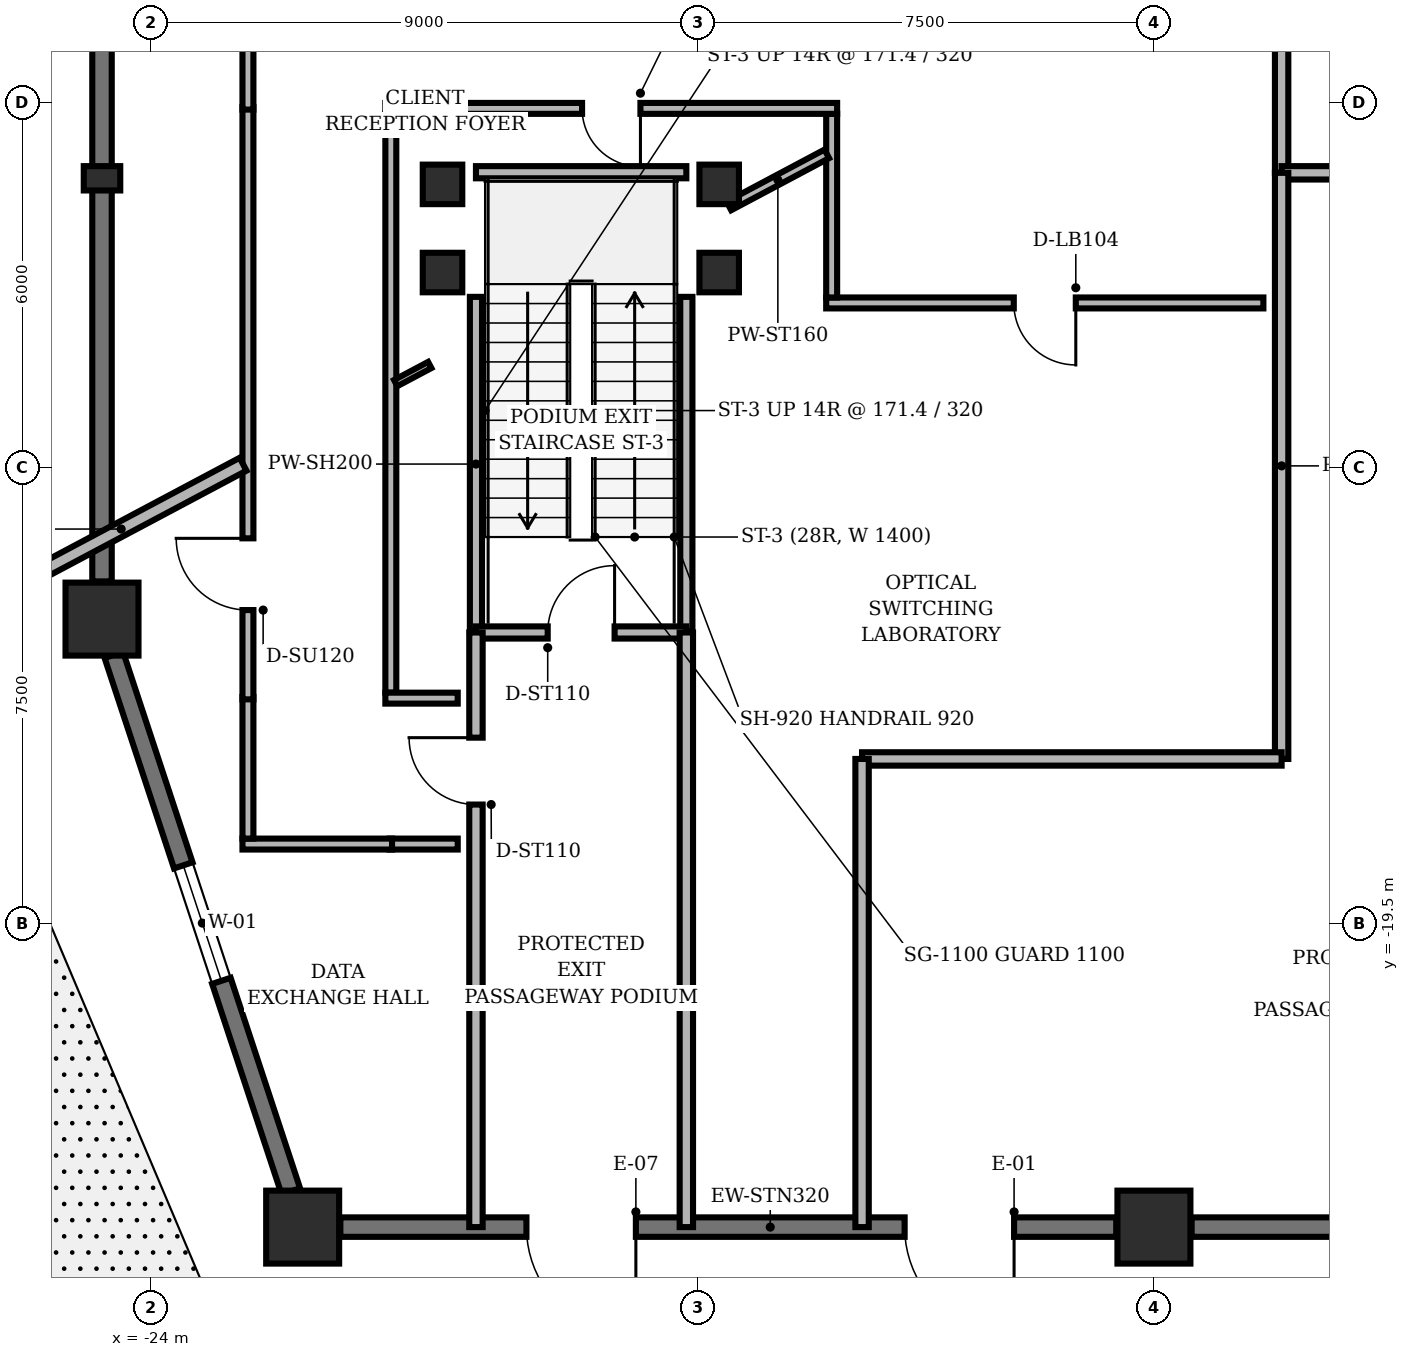
"""IFC4 building model, lengths in metres.
Left out: names, types, materials, properties, quantities, classifications, styles, units other than length and angle.
Written with IfcOpenShell. Run it as: python <this file> out.ifc"""

import sys

from ifc_helpers import new_model, si_unit, direction, frame, frame_2d, origin, origin_2d, place, context, subcontext, project, spatial, rectangle, extrude, element, fill, save


model = new_model("IFC4")
c1 = context("Model", 3, precision=1e-05, world=origin(), true_north=direction((0.0, 1.0)))
c2 = subcontext(c1, "Body", "Model", "MODEL_VIEW")
j1 = project(units=[si_unit("LENGTHUNIT", "METRE"), si_unit("PLANEANGLEUNIT", "RADIAN")], contexts=[c1])
p1 = place(None, origin())
s1 = spatial("IfcSite", under=j1, at=p1, CompositionType="ELEMENT")
p2 = place(p1, origin())
s2 = spatial("IfcBuilding", under=s1, at=p2, CompositionType="ELEMENT")
p3 = place(p2, origin())
s3 = spatial("IfcBuildingStorey", under=s2, at=p3, CompositionType="ELEMENT", Elevation=0.0)
for number, where, z_axis, x_axis in (
    (1, (-21.5, -24.5, 0.0), (0.0, 0.0, 1.0), (1.0, 0.0, 0.0)),
    (2, (-7.5, -24.5, 0.0), (0.0, 0.0, 1.0), (1.0, 0.0, 0.0)),
    (3, (-24.8, -14.5, 0.0), (0.0, 0.0, 1.0), (1.0, 0.0, 0.0)),
):
    element("IfcColumn", number, at=place(p3, frame(where, z_axis=z_axis, x_axis=x_axis)), inside=s3, PredefinedType="COLUMN", context=c2, shape_type="SweptSolid", body=[
        extrude(rectangle(XDim=1.2, YDim=1.2, at=origin_2d()), origin(), (0.0, 0.0, 1.0), 4.8),
    ])
for number, where, z_axis, x_axis in (
    (4, (-19.2, -8.8, 0.0), (0.0, 0.0, 1.0), (1.0, 0.0, 0.0)),
    (5, (-14.65, -8.8, 0.0), (0.0, 0.0, 1.0), (1.0, 0.0, 0.0)),
    (6, (-19.2, -7.35, 0.0), (0.0, 0.0, 1.0), (1.0, 0.0, 0.0)),
    (7, (-14.65, -7.35, 0.0), (0.0, 0.0, 1.0), (1.0, 0.0, 0.0)),
):
    element("IfcColumn", number, at=place(p3, frame(where, z_axis=z_axis, x_axis=x_axis)), inside=s3, PredefinedType="COLUMN", context=c2, shape_type="SweptSolid", body=[
        extrude(rectangle(XDim=0.65, YDim=0.65, at=origin_2d()), origin(), (0.0, 0.0, 1.0), 4.8),
    ])
p4 = place(p3, frame((-24.8, -7.25, 0.0), z_axis=(0.0, 0.0, 1.0), x_axis=(1.0, 0.0, 0.0)))
e8 = element("IfcColumn", 8, at=p4, inside=s3, PredefinedType="PILASTER", context=c2, shape_type="SweptSolid", body=[
    extrude(rectangle(XDim=0.6, YDim=0.4, at=origin_2d()), origin(), (0.0, 0.0, 1.0), 4.8),
])
p5 = place(p3, frame((-8.12, -24.5, 0.0), z_axis=(0.0, 0.0, 1.0), x_axis=(-1.0, 0.0, 0.0)))
e9 = element("IfcWall", 9, at=p5, inside=s3, PredefinedType="SOLIDWALL", context=c2, shape_type="SweptSolid", body=[
    extrude(rectangle(XDim=12.76, YDim=0.32, at=frame_2d((6.38, 0.0))), origin(), (0.0, 0.0, 1.0), 3.868),
])
p6 = place(p5, frame((1.68, 0.0, 0.0)))
e10 = element("IfcOpeningElement", 10, at=p6, cuts=e9, PredefinedType="OPENING", context=c2, shape_type="SweptSolid", body=[
    extrude(rectangle(XDim=1.8, YDim=2.3, at=frame_2d((0.9, 1.15))), frame((0.0, 0.17, 0.0), z_axis=(0.0, -1.0, 0.0), x_axis=(1.0, 0.0, 0.0)), (0.0, 0.0, 1.0), 0.34),
])
p7 = place(p5, frame((7.9, 0.0, 0.0)))
e11 = element("IfcOpeningElement", 11, at=p7, cuts=e9, PredefinedType="OPENING", context=c2, shape_type="SweptSolid", body=[
    extrude(rectangle(XDim=1.8, YDim=2.3, at=frame_2d((0.9, 1.15))), frame((0.0, 0.17, 0.0), z_axis=(0.0, -1.0, 0.0), x_axis=(1.0, 0.0, 0.0)), (0.0, 0.0, 1.0), 0.34),
])
p8 = place(p3, frame((4.88, -24.5, 0.0), z_axis=(0.0, 0.0, 1.0), x_axis=(-1.0, 0.0, 0.0)))
e12 = element("IfcWall", 12, at=p8, inside=s3, PredefinedType="SOLIDWALL", context=c2, shape_type="SweptSolid", body=[
    extrude(rectangle(XDim=11.76, YDim=0.32, at=frame_2d((5.88, 0.0))), origin(), (0.0, 0.0, 1.0), 3.868),
])
p9 = place(p8, frame((1.18, 0.0, 0.0)))
e13 = element("IfcOpeningElement", 13, at=p9, cuts=e12, PredefinedType="OPENING", context=c2, shape_type="SweptSolid", body=[
    extrude(rectangle(XDim=1.8, YDim=2.3, at=frame_2d((0.9, 1.15))), frame((0.0, 0.17, 0.0), z_axis=(0.0, -1.0, 0.0), x_axis=(1.0, 0.0, 0.0)), (0.0, 0.0, 1.0), 0.34),
])
p10 = place(p3, frame((-24.8, -13.88, 0.0), z_axis=(0.0, 0.0, 1.0), x_axis=(0.0, 1.0, 0.0)))
e14 = element("IfcWall", 14, at=p10, inside=s3, PredefinedType="SOLIDWALL", context=c2, shape_type="SweptSolid", body=[
    extrude(rectangle(XDim=13.26, YDim=0.32, at=frame_2d((6.63, 0.0))), origin(), (0.0, 0.0, 1.0), 3.868),
])
p11 = place(p3, frame((-21.694, -23.911, 0.0), z_axis=(0.0, 0.0, 1.0), x_axis=(-0.313380298023, 0.949627710638, 0.0)))
e15 = element("IfcWall", 15, at=p11, inside=s3, PredefinedType="SOLIDWALL", context=c2, shape_type="SweptSolid", body=[
    extrude(rectangle(XDim=9.29, YDim=0.32, at=frame_2d((4.645, 0.0))), origin(), (0.0, 0.0, 1.0), 3.868),
])
p12 = place(p11, frame((3.645, 0.0, 0.65)))
e16 = element("IfcOpeningElement", 16, at=p12, cuts=e15, PredefinedType="OPENING", context=c2, shape_type="SweptSolid", body=[
    extrude(rectangle(XDim=2.0, YDim=1.6, at=frame_2d((1.0, 0.8))), frame((0.0, 0.17, 0.0), z_axis=(0.0, -1.0, 0.0), x_axis=(1.0, 0.0, 0.0)), (0.0, 0.0, 1.0), 0.34),
])
p13 = place(p3, frame((-5.4, -7.16, 0.0), z_axis=(0.0, 0.0, 1.0), x_axis=(0.0, 1.0, 0.0)))
e17 = element("IfcWall", 17, at=p13, inside=s3, PredefinedType="PARTITIONING", context=c2, shape_type="SweptSolid", body=[
    extrude(rectangle(XDim=2.71, YDim=0.22, at=frame_2d((1.355, 0.0))), origin(), (0.0, 0.0, 1.0), 4.473),
])
p14 = place(p3, frame((0.0, -7.16, 0.0), z_axis=(0.0, 0.0, 1.0), x_axis=(-1.0, 0.0, 0.0)))
e18 = element("IfcWall", 18, at=p14, inside=s3, PredefinedType="PARTITIONING", context=c2, shape_type="SweptSolid", body=[
    extrude(rectangle(XDim=5.4, YDim=0.22, at=frame_2d((2.7, 0.0))), origin(), (0.0, 0.0, 1.0), 4.473),
])
p15 = place(p14, frame((2.85, 0.0, 0.0)))
e19 = element("IfcOpeningElement", 19, at=p15, cuts=e18, PredefinedType="OPENING", context=c2, shape_type="SweptSolid", body=[
    extrude(rectangle(XDim=1.12, YDim=2.02, at=frame_2d((0.56, 1.01))), frame((0.0, 0.12, 0.0), z_axis=(0.0, -1.0, 0.0), x_axis=(1.0, 0.0, 0.0)), (0.0, 0.0, 1.0), 0.24),
])
for number, where, z_axis, x_axis in (
    (20, (-18.65, -14.7, 0.0), (0.0, 0.0, 1.0), (0.0, 1.0, 0.0)),
    (21, (-15.19, -14.7, 0.0), (0.0, 0.0, 1.0), (0.0, 1.0, 0.0)),
):
    element("IfcWall", number, at=place(p3, frame(where, z_axis=z_axis, x_axis=x_axis)), inside=s3, PredefinedType="PARTITIONING", context=c2, shape_type="SweptSolid", body=[
        extrude(rectangle(XDim=5.5, YDim=0.2, at=frame_2d((2.75, 0.0))), origin(), (0.0, 0.0, 1.0), 4.473),
    ])
p16 = place(p3, frame((-18.65, -7.15, 0.0), z_axis=(0.0, 0.0, 1.0), x_axis=(1.0, 0.0, 0.0)))
e22 = element("IfcWall", 22, at=p16, inside=s3, PredefinedType="PARTITIONING", context=c2, shape_type="SweptSolid", body=[
    extrude(rectangle(XDim=3.46, YDim=0.2, at=frame_2d((1.73, 0.0))), origin(), (0.0, 0.0, 1.0), 1.797),
])
p17 = place(p3, frame((-18.65, -14.72, 0.0), z_axis=(0.0, 0.0, 1.0), x_axis=(1.0, 0.0, 0.0)))
e23 = element("IfcWall", 23, at=p17, inside=s3, PredefinedType="PARTITIONING", context=c2, shape_type="SweptSolid", body=[
    extrude(rectangle(XDim=3.46, YDim=0.2, at=frame_2d((1.73, 0.0))), origin(), (0.0, 0.0, 1.0), 4.473),
])
p18 = place(p17, frame((1.18, 0.0, 0.0)))
e24 = element("IfcOpeningElement", 24, at=p18, cuts=e23, PredefinedType="OPENING", context=c2, shape_type="SweptSolid", body=[
    extrude(rectangle(XDim=1.1, YDim=2.04, at=frame_2d((0.55, 1.02))), frame((0.0, 0.11, 0.0), z_axis=(0.0, -1.0, 0.0), x_axis=(1.0, 0.0, 0.0)), (0.0, 0.0, 1.0), 0.22),
])
p19 = place(p3, frame((-5.4, -16.8, 0.0), z_axis=(0.0, 0.0, 1.0), x_axis=(0.0, 1.0, 0.0)))
e25 = element("IfcWall", 25, at=p19, inside=s3, PredefinedType="PARTITIONING", context=c2, shape_type="SweptSolid", body=[
    extrude(rectangle(XDim=9.64, YDim=0.22, at=frame_2d((4.82, 0.0))), origin(), (0.0, 0.0, 1.0), 4.473),
])
p20 = place(p3, frame((-12.3, -16.8, 0.0), z_axis=(0.0, 0.0, 1.0), x_axis=(1.0, 0.0, 0.0)))
e26 = element("IfcWall", 26, at=p20, inside=s3, PredefinedType="PARTITIONING", context=c2, shape_type="SweptSolid", body=[
    extrude(rectangle(XDim=6.9, YDim=0.22, at=frame_2d((3.45, 0.0))), origin(), (0.0, 0.0, 1.0), 4.473),
])
p21 = place(p3, frame((-12.3, -24.5, 0.0), z_axis=(0.0, 0.0, 1.0), x_axis=(0.0, 1.0, 0.0)))
e27 = element("IfcWall", 27, at=p21, inside=s3, PredefinedType="PARTITIONING", context=c2, shape_type="SweptSolid", body=[
    extrude(rectangle(XDim=7.7, YDim=0.22, at=frame_2d((3.85, 0.0))), origin(), (0.0, 0.0, 1.0), 4.473),
])
p22 = place(p3, frame((-18.65, -24.5, 0.0), z_axis=(0.0, 0.0, 1.0), x_axis=(0.0, 1.0, 0.0)))
e28 = element("IfcWall", 28, at=p22, inside=s3, PredefinedType="PARTITIONING", context=c2, shape_type="SweptSolid", body=[
    extrude(rectangle(XDim=9.78, YDim=0.22, at=frame_2d((4.89, 0.0))), origin(), (0.0, 0.0, 1.0), 4.473),
])
p23 = place(p22, frame((6.95, 0.0, 0.0)))
e29 = element("IfcOpeningElement", 29, at=p23, cuts=e28, PredefinedType="OPENING", context=c2, shape_type="SweptSolid", body=[
    extrude(rectangle(XDim=1.1, YDim=2.04, at=frame_2d((0.55, 1.02))), frame((0.0, 0.12, 0.0), z_axis=(0.0, -1.0, 0.0), x_axis=(1.0, 0.0, 0.0)), (0.0, 0.0, 1.0), 0.24),
])
p24 = place(p3, frame((-15.19, -24.5, 0.0), z_axis=(0.0, 0.0, 1.0), x_axis=(0.0, 1.0, 0.0)))
e30 = element("IfcWall", 30, at=p24, inside=s3, PredefinedType="PARTITIONING", context=c2, shape_type="SweptSolid", body=[
    extrude(rectangle(XDim=9.78, YDim=0.22, at=frame_2d((4.89, 0.0))), origin(), (0.0, 0.0, 1.0), 4.473),
])
p25 = place(p3, frame((-5.7, -9.3, 0.0), z_axis=(0.0, 0.0, 1.0), x_axis=(-1.0, 0.0, 0.0)))
e31 = element("IfcWall", 31, at=p25, inside=s3, PredefinedType="PARTITIONING", context=c2, shape_type="SweptSolid", body=[
    extrude(rectangle(XDim=7.19, YDim=0.18, at=frame_2d((3.595, 0.0))), origin(), (0.0, 0.0, 1.0), 3.987),
])
p26 = place(p25, frame((3.085, 0.0, 0.0)))
e32 = element("IfcOpeningElement", 32, at=p26, cuts=e31, PredefinedType="OPENING", context=c2, shape_type="SweptSolid", body=[
    extrude(rectangle(XDim=1.02, YDim=2.02, at=frame_2d((0.51, 1.01))), frame((0.0, 0.1, 0.0), z_axis=(0.0, -1.0, 0.0), x_axis=(1.0, 0.0, 0.0)), (0.0, 0.0, 1.0), 0.2),
])
p27 = place(p3, frame((-12.8, -9.21, 0.0), z_axis=(0.0, 0.0, 1.0), x_axis=(0.0, 1.0, 0.0)))
e33 = element("IfcWall", 33, at=p27, inside=s3, PredefinedType="PARTITIONING", context=c2, shape_type="SweptSolid", body=[
    extrude(rectangle(XDim=3.02, YDim=0.18, at=frame_2d((1.51, 0.0))), origin(), (0.0, 0.0, 1.0), 4.473),
])
p28 = place(p3, frame((-12.71, -6.1, 0.0), z_axis=(0.0, 0.0, 1.0), x_axis=(-1.0, 0.0, 0.0)))
e34 = element("IfcWall", 34, at=p28, inside=s3, PredefinedType="PARTITIONING", context=c2, shape_type="SweptSolid", body=[
    extrude(rectangle(XDim=7.43, YDim=0.18, at=frame_2d((3.715, 0.0))), origin(), (0.0, 0.0, 1.0), 4.473),
])
p29 = place(p28, frame((3.235, 0.0, 0.0)))
e35 = element("IfcOpeningElement", 35, at=p29, cuts=e34, PredefinedType="OPENING", context=c2, shape_type="SweptSolid", body=[
    extrude(rectangle(XDim=0.96, YDim=2.02, at=frame_2d((0.48, 1.01))), frame((0.0, 0.1, 0.0), z_axis=(0.0, -1.0, 0.0), x_axis=(1.0, 0.0, 0.0)), (0.0, 0.0, 1.0), 0.2),
])
p30 = place(p3, frame((-20.05, -6.19, 0.0), z_axis=(0.0, 0.0, 1.0), x_axis=(0.0, -1.0, 0.0)))
e36 = element("IfcWall", 36, at=p30, inside=s3, PredefinedType="PARTITIONING", context=c2, shape_type="SweptSolid", body=[
    extrude(rectangle(XDim=9.52, YDim=0.18, at=frame_2d((4.76, 0.0))), origin(), (0.0, 0.0, 1.0), 3.526),
])
p31 = place(p3, frame((-20.14, -15.8, 0.0), z_axis=(0.0, 0.0, 1.0), x_axis=(1.0, 0.0, 0.0)))
e37 = element("IfcWall", 37, at=p31, inside=s3, PredefinedType="PARTITIONING", context=c2, shape_type="SweptSolid", body=[
    extrude(rectangle(XDim=1.19, YDim=0.18, at=frame_2d((0.595, 0.0))), origin(), (0.0, 0.0, 1.0), 4.473),
])
p32 = place(p3, frame((-18.95, -18.2, 0.0), z_axis=(0.0, 0.0, 1.0), x_axis=(-1.0, 0.0, 0.0)))
e38 = element("IfcWall", 38, at=p32, inside=s3, PredefinedType="PARTITIONING", context=c2, shape_type="SweptSolid", body=[
    extrude(rectangle(XDim=1.12, YDim=0.18, at=frame_2d((0.56, 0.0))), origin(), (0.0, 0.0, 1.0), 4.473),
])
p33 = place(p3, frame((-20.03, -18.2, 0.0), z_axis=(0.0, 0.0, 1.0), x_axis=(-1.0, 0.0, 0.0)))
e39 = element("IfcWall", 39, at=p33, inside=s3, PredefinedType="PARTITIONING", context=c2, shape_type="SweptSolid", body=[
    extrude(rectangle(XDim=2.46, YDim=0.18, at=frame_2d((1.23, 0.0))), origin(), (0.0, 0.0, 1.0), 4.473),
])
p34 = place(p3, frame((-22.4, -18.11, 0.0), z_axis=(0.0, 0.0, 1.0), x_axis=(0.0, 1.0, 0.0)))
e40 = element("IfcWall", 40, at=p34, inside=s3, PredefinedType="PARTITIONING", context=c2, shape_type="SweptSolid", body=[
    extrude(rectangle(XDim=2.33, YDim=0.18, at=frame_2d((1.165, 0.0))), origin(), (0.0, 0.0, 1.0), 4.473),
])
p35 = place(p3, frame((-22.4, -15.82, 0.0), z_axis=(0.0, 0.0, 1.0), x_axis=(0.0, 1.0, 0.0)))
e41 = element("IfcWall", 41, at=p35, inside=s3, PredefinedType="PARTITIONING", context=c2, shape_type="SweptSolid", body=[
    extrude(rectangle(XDim=9.74, YDim=0.18, at=frame_2d((4.87, 0.0))), origin(), (0.0, 0.0, 1.0), 4.473),
])
p36 = place(p35, frame((1.469, 0.0, 0.0)))
e42 = element("IfcOpeningElement", 42, at=p36, cuts=e41, PredefinedType="OPENING", context=c2, shape_type="SweptSolid", body=[
    extrude(rectangle(XDim=1.18, YDim=2.02, at=frame_2d((0.59, 1.01))), frame((0.0, 0.1, 0.0), z_axis=(0.0, -1.0, 0.0), x_axis=(1.0, 0.0, 0.0)), (0.0, 0.0, 1.0), 0.2),
])
p37 = place(p3, frame((-22.4, -6.12, 0.0), z_axis=(0.0, 0.0, 1.0), x_axis=(0.0, 1.0, 0.0)))
e43 = element("IfcWall", 43, at=p37, inside=s3, PredefinedType="PARTITIONING", context=c2, shape_type="SweptSolid", body=[
    extrude(rectangle(XDim=2.33, YDim=0.18, at=frame_2d((1.165, 0.0))), origin(), (0.0, 0.0, 1.0), 4.473),
])
p38 = place(p3, frame((-12.88, -6.848, 0.0), z_axis=(0.0, 0.0, 1.0), x_axis=(-0.882926709307, -0.469510836928, 0.0)))
e44 = element("IfcWall", 44, at=p38, inside=s3, PredefinedType="PARTITIONING", context=c2, shape_type="SweptSolid", body=[
    extrude(rectangle(XDim=1.823, YDim=0.16, at=frame_2d((0.912, 0.0))), origin(), (0.0, 0.0, 1.0), 4.473),
])
p39 = place(p3, frame((-19.41, -10.321, 0.0), z_axis=(0.0, 0.0, 1.0), x_axis=(-0.883065873803, -0.469249041049, 0.0)))
e45 = element("IfcWall", 45, at=p39, inside=s3, PredefinedType="MOVABLE", context=c2, shape_type="SweptSolid", body=[
    extrude(rectangle(XDim=0.634, YDim=0.115, at=frame_2d((0.317, 0.0))), origin(), (0.0, 0.0, 1.0), 4.473),
])
p40 = place(p3, frame((-22.48, -11.953, 0.0), z_axis=(0.0, 0.0, 1.0), x_axis=(-0.882954888604, -0.469457841228, 0.0)))
e46 = element("IfcWall", 46, at=p40, inside=s3, PredefinedType="PARTITIONING", context=c2, shape_type="SweptSolid", body=[
    extrude(rectangle(XDim=4.542, YDim=0.24, at=frame_2d((2.271, 0.0))), origin(), (0.0, 0.0, 1.0), 4.473),
])
p41 = place(p6, origin())
e47 = element("IfcDoor", 47, at=p41, inside=s3, OperationType="SINGLE_SWING_LEFT", PredefinedType="DOOR", context=c2, shape_type="SweptSolid", body=[
    extrude(rectangle(XDim=1.8, YDim=2.3, at=frame_2d((0.9, 1.15))), frame((0.0, 0.025, 0.0), z_axis=(0.0, -1.0, 0.0), x_axis=(1.0, 0.0, 0.0)), (0.0, 0.0, 1.0), 0.05),
])
fill(e10, e47)
p42 = place(p7, origin())
e48 = element("IfcDoor", 48, at=p42, inside=s3, OperationType="SINGLE_SWING_LEFT", PredefinedType="DOOR", context=c2, shape_type="SweptSolid", body=[
    extrude(rectangle(XDim=1.8, YDim=2.3, at=frame_2d((0.9, 1.15))), frame((0.0, 0.025, 0.0), z_axis=(0.0, -1.0, 0.0), x_axis=(1.0, 0.0, 0.0)), (0.0, 0.0, 1.0), 0.05),
])
fill(e11, e48)
p43 = place(p12, origin())
e49 = element("IfcWindow", 49, at=p43, inside=s3, PartitioningType="SINGLE_PANEL", PredefinedType="WINDOW", context=c2, shape_type="SweptSolid", body=[
    extrude(rectangle(XDim=2.0, YDim=1.6, at=frame_2d((1.0, 0.8))), frame((0.0, 0.03, 0.0), z_axis=(0.0, -1.0, 0.0), x_axis=(1.0, 0.0, 0.0)), (0.0, 0.0, 1.0), 0.06),
])
fill(e16, e49)
p44 = place(p18, origin())
e50 = element("IfcDoor", 50, at=p44, inside=s3, OperationType="SINGLE_SWING_RIGHT", PredefinedType="DOOR", context=c2, shape_type="SweptSolid", body=[
    extrude(rectangle(XDim=1.1, YDim=2.04, at=frame_2d((0.55, 1.02))), frame((0.0, 0.025, 0.0), z_axis=(0.0, -1.0, 0.0), x_axis=(1.0, 0.0, 0.0)), (0.0, 0.0, 1.0), 0.05),
])
fill(e24, e50)
p45 = place(p23, origin())
e51 = element("IfcDoor", 51, at=p45, inside=s3, OperationType="SINGLE_SWING_RIGHT", PredefinedType="DOOR", context=c2, shape_type="SweptSolid", body=[
    extrude(rectangle(XDim=1.1, YDim=2.04, at=frame_2d((0.55, 1.02))), frame((0.0, 0.025, 0.0), z_axis=(0.0, -1.0, 0.0), x_axis=(1.0, 0.0, 0.0)), (0.0, 0.0, 1.0), 0.05),
])
fill(e29, e51)
p46 = place(p29, origin())
e52 = element("IfcDoor", 52, at=p46, inside=s3, OperationType="SINGLE_SWING_LEFT", PredefinedType="DOOR", context=c2, shape_type="SweptSolid", body=[
    extrude(rectangle(XDim=0.96, YDim=2.02, at=frame_2d((0.48, 1.01))), frame((0.0, 0.025, 0.0), z_axis=(0.0, -1.0, 0.0), x_axis=(1.0, 0.0, 0.0)), (0.0, 0.0, 1.0), 0.05),
])
fill(e35, e52)
p47 = place(p36, origin())
e53 = element("IfcDoor", 53, at=p47, inside=s3, OperationType="SINGLE_SWING_RIGHT", PredefinedType="DOOR", context=c2, shape_type="SweptSolid", body=[
    extrude(rectangle(XDim=1.18, YDim=2.02, at=frame_2d((0.59, 1.01))), frame((0.0, 0.025, 0.0), z_axis=(0.0, -1.0, 0.0), x_axis=(1.0, 0.0, 0.0)), (0.0, 0.0, 1.0), 0.05),
])
fill(e42, e53)
p48 = place(p26, origin())
e54 = element("IfcDoor", 54, at=p48, inside=s3, OperationType="SINGLE_SWING_LEFT", PredefinedType="DOOR", context=c2, shape_type="SweptSolid", body=[
    extrude(rectangle(XDim=1.02, YDim=2.02, at=frame_2d((0.51, 1.01))), frame((0.0, 0.025, 0.0), z_axis=(0.0, -1.0, 0.0), x_axis=(1.0, 0.0, 0.0)), (0.0, 0.0, 1.0), 0.05),
])
fill(e32, e54)
save(model, sys.argv[1])
